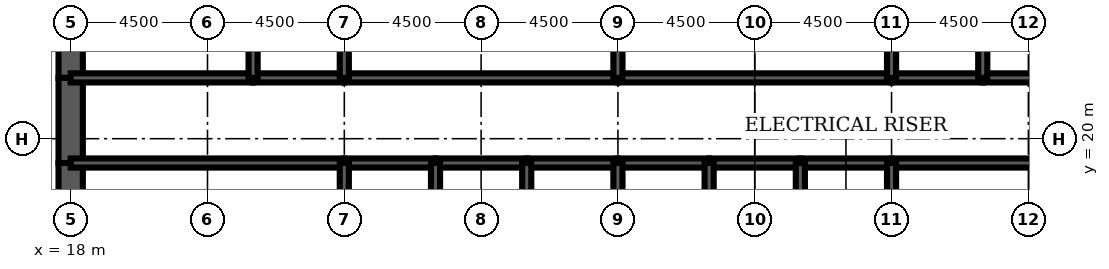
"""IFC4 building model, lengths in metres.
Left out: names, types, materials, properties, quantities, classifications, styles, units other than length and angle.
Written with IfcOpenShell. Run it as: python <this file> out.ifc"""

import sys

from ifc_helpers import new_model, si_unit, direction, frame, frame_2d, origin, place, context, subcontext, project, spatial, rectangle, extrude, element, fill, save


model = new_model("IFC4")
c1 = context("Model", 3, precision=1e-05, world=origin(), true_north=direction((0.0, 1.0)))
c2 = subcontext(c1, "Body", "Model", "MODEL_VIEW")
j1 = project(units=[si_unit("LENGTHUNIT", "METRE"), si_unit("PLANEANGLEUNIT", "RADIAN")], contexts=[c1])
p1 = place(None, origin())
s1 = spatial("IfcSite", under=j1, at=p1, CompositionType="ELEMENT")
p2 = place(p1, origin())
s2 = spatial("IfcBuilding", under=s1, at=p2, CompositionType="ELEMENT")
p3 = place(p2, frame((0.0, 0.0, 232.0)))
s3 = spatial("IfcBuildingStorey", under=s2, at=p3, CompositionType="ELEMENT", Elevation=232.0)
p4 = place(p3, frame((18.0, 26.0, 0.0), z_axis=(0.0, 0.0, 1.0), x_axis=(0.0, -1.0, 0.0)))
e1 = element("IfcWall", 1, at=p4, inside=s3, PredefinedType="SHEAR", context=c2, shape_type="SweptSolid", body=[
    extrude(rectangle(XDim=4.0, YDim=0.8, at=frame_2d((2.0, 0.0))), origin(), (0.0, 0.0, 1.0), 4.2),
])
p5 = place(p3, frame((18.0, 22.0, 0.0), z_axis=(0.0, 0.0, 1.0), x_axis=(0.0, -1.0, 0.0)))
e2 = element("IfcWall", 2, at=p5, inside=s3, PredefinedType="SHEAR", context=c2, shape_type="SweptSolid", body=[
    extrude(rectangle(XDim=2.8, YDim=0.8, at=frame_2d((1.4, 0.0))), origin(), (0.0, 0.0, 1.0), 4.2),
])
p6 = place(p5, frame((0.6, 0.0, 0.0)))
e3 = element("IfcOpeningElement", 3, at=p6, cuts=e2, PredefinedType="OPENING", context=c2, shape_type="SweptSolid", body=[
    extrude(rectangle(XDim=1.8, YDim=2.1, at=frame_2d((0.9, 1.05))), frame((0.0, 0.41, 0.0), z_axis=(0.0, -1.0, 0.0), x_axis=(1.0, 0.0, 0.0)), (0.0, 0.0, 1.0), 0.82),
])
p7 = place(p3, frame((18.0, 19.2, 0.0), z_axis=(0.0, 0.0, 1.0), x_axis=(0.0, -1.0, 0.0)))
e4 = element("IfcWall", 4, at=p7, inside=s3, PredefinedType="SHEAR", context=c2, shape_type="SweptSolid", body=[
    extrude(rectangle(XDim=3.2, YDim=0.8, at=frame_2d((1.6, 0.0))), origin(), (0.0, 0.0, 1.0), 4.2),
])
p8 = place(p3, frame((18.0, 19.2, 0.0), z_axis=(0.0, 0.0, 1.0), x_axis=(1.0, 0.0, 0.0)))
e5 = element("IfcWall", 5, at=p8, inside=s3, PredefinedType="SOLIDWALL", context=c2, shape_type="SweptSolid", body=[
    extrude(rectangle(XDim=9.0, YDim=0.3, at=frame_2d((4.5, 0.0))), origin(), (0.0, 0.0, 1.0), 4.2),
])
p9 = place(p8, frame((0.65, 0.0, 0.0)))
e6 = element("IfcOpeningElement", 6, at=p9, cuts=e5, PredefinedType="OPENING", context=c2, shape_type="SweptSolid", body=[
    extrude(rectangle(XDim=1.0, YDim=2.1, at=frame_2d((0.5, 1.05))), frame((0.0, 0.16, 0.0), z_axis=(0.0, -1.0, 0.0), x_axis=(1.0, 0.0, 0.0)), (0.0, 0.0, 1.0), 0.32),
])
p10 = place(p3, frame((27.0, 19.2, 0.0), z_axis=(0.0, 0.0, 1.0), x_axis=(1.0, 0.0, 0.0)))
e7 = element("IfcWall", 7, at=p10, inside=s3, PredefinedType="SOLIDWALL", context=c2, shape_type="SweptSolid", body=[
    extrude(rectangle(XDim=3.0, YDim=0.3, at=frame_2d((1.5, 0.0))), origin(), (0.0, 0.0, 1.0), 4.2),
])
p11 = place(p10, frame((0.95, 0.0, 0.0)))
e8 = element("IfcOpeningElement", 8, at=p11, cuts=e7, PredefinedType="OPENING", context=c2, shape_type="SweptSolid", body=[
    extrude(rectangle(XDim=1.1, YDim=2.2, at=frame_2d((0.55, 1.1))), frame((0.0, 0.16, 0.0), z_axis=(0.0, -1.0, 0.0), x_axis=(1.0, 0.0, 0.0)), (0.0, 0.0, 1.0), 0.32),
])
p12 = place(p3, frame((30.0, 19.2, 0.0), z_axis=(0.0, 0.0, 1.0), x_axis=(1.0, 0.0, 0.0)))
e9 = element("IfcWall", 9, at=p12, inside=s3, PredefinedType="SOLIDWALL", context=c2, shape_type="SweptSolid", body=[
    extrude(rectangle(XDim=3.0, YDim=0.3, at=frame_2d((1.5, 0.0))), origin(), (0.0, 0.0, 1.0), 4.2),
])
p13 = place(p12, frame((0.95, 0.0, 0.0)))
e10 = element("IfcOpeningElement", 10, at=p13, cuts=e9, PredefinedType="OPENING", context=c2, shape_type="SweptSolid", body=[
    extrude(rectangle(XDim=1.1, YDim=2.2, at=frame_2d((0.55, 1.1))), frame((0.0, 0.16, 0.0), z_axis=(0.0, -1.0, 0.0), x_axis=(1.0, 0.0, 0.0)), (0.0, 0.0, 1.0), 0.32),
])
p14 = place(p3, frame((33.0, 19.2, 0.0), z_axis=(0.0, 0.0, 1.0), x_axis=(1.0, 0.0, 0.0)))
e11 = element("IfcWall", 11, at=p14, inside=s3, PredefinedType="SOLIDWALL", context=c2, shape_type="SweptSolid", body=[
    extrude(rectangle(XDim=3.0, YDim=0.3, at=frame_2d((1.5, 0.0))), origin(), (0.0, 0.0, 1.0), 4.2),
])
p15 = place(p14, frame((0.95, 0.0, 0.0)))
e12 = element("IfcOpeningElement", 12, at=p15, cuts=e11, PredefinedType="OPENING", context=c2, shape_type="SweptSolid", body=[
    extrude(rectangle(XDim=1.1, YDim=2.2, at=frame_2d((0.55, 1.1))), frame((0.0, 0.16, 0.0), z_axis=(0.0, -1.0, 0.0), x_axis=(1.0, 0.0, 0.0)), (0.0, 0.0, 1.0), 0.32),
])
p16 = place(p3, frame((36.0, 19.2, 0.0), z_axis=(0.0, 0.0, 1.0), x_axis=(1.0, 0.0, 0.0)))
e13 = element("IfcWall", 13, at=p16, inside=s3, PredefinedType="SOLIDWALL", context=c2, shape_type="SweptSolid", body=[
    extrude(rectangle(XDim=3.0, YDim=0.3, at=frame_2d((1.5, 0.0))), origin(), (0.0, 0.0, 1.0), 4.2),
])
p17 = place(p16, frame((0.95, 0.0, 0.0)))
e14 = element("IfcOpeningElement", 14, at=p17, cuts=e13, PredefinedType="OPENING", context=c2, shape_type="SweptSolid", body=[
    extrude(rectangle(XDim=1.1, YDim=2.2, at=frame_2d((0.55, 1.1))), frame((0.0, 0.16, 0.0), z_axis=(0.0, -1.0, 0.0), x_axis=(1.0, 0.0, 0.0)), (0.0, 0.0, 1.0), 0.32),
])
p18 = place(p3, frame((39.0, 19.2, 0.0), z_axis=(0.0, 0.0, 1.0), x_axis=(1.0, 0.0, 0.0)))
e15 = element("IfcWall", 15, at=p18, inside=s3, PredefinedType="SOLIDWALL", context=c2, shape_type="SweptSolid", body=[
    extrude(rectangle(XDim=3.0, YDim=0.3, at=frame_2d((1.5, 0.0))), origin(), (0.0, 0.0, 1.0), 4.2),
])
p19 = place(p18, frame((1.0, 0.0, 0.0)))
e16 = element("IfcOpeningElement", 16, at=p19, cuts=e15, PredefinedType="OPENING", context=c2, shape_type="SweptSolid", body=[
    extrude(rectangle(XDim=1.0, YDim=2.1, at=frame_2d((0.5, 1.05))), frame((0.0, 0.16, 0.0), z_axis=(0.0, -1.0, 0.0), x_axis=(1.0, 0.0, 0.0)), (0.0, 0.0, 1.0), 0.32),
])
p20 = place(p3, frame((42.0, 19.2, 0.0), z_axis=(0.0, 0.0, 1.0), x_axis=(1.0, 0.0, 0.0)))
e17 = element("IfcWall", 17, at=p20, inside=s3, PredefinedType="SOLIDWALL", context=c2, shape_type="SweptSolid", body=[
    extrude(rectangle(XDim=3.0, YDim=0.3, at=frame_2d((1.5, 0.0))), origin(), (0.0, 0.0, 1.0), 4.2),
])
p21 = place(p20, frame((1.0, 0.0, 0.0)))
e18 = element("IfcOpeningElement", 18, at=p21, cuts=e17, PredefinedType="OPENING", context=c2, shape_type="SweptSolid", body=[
    extrude(rectangle(XDim=1.0, YDim=2.1, at=frame_2d((0.5, 1.05))), frame((0.0, 0.16, 0.0), z_axis=(0.0, -1.0, 0.0), x_axis=(1.0, 0.0, 0.0)), (0.0, 0.0, 1.0), 0.32),
])
p22 = place(p3, frame((45.0, 19.2, 0.0), z_axis=(0.0, 0.0, 1.0), x_axis=(1.0, 0.0, 0.0)))
e19 = element("IfcWall", 19, at=p22, inside=s3, PredefinedType="SOLIDWALL", context=c2, shape_type="SweptSolid", body=[
    extrude(rectangle(XDim=9.0, YDim=0.3, at=frame_2d((4.5, 0.0))), origin(), (0.0, 0.0, 1.0), 4.2),
])
p23 = place(p22, frame((7.35, 0.0, 0.0)))
e20 = element("IfcOpeningElement", 20, at=p23, cuts=e19, PredefinedType="OPENING", context=c2, shape_type="SweptSolid", body=[
    extrude(rectangle(XDim=1.0, YDim=2.1, at=frame_2d((0.5, 1.05))), frame((0.0, 0.16, 0.0), z_axis=(0.0, -1.0, 0.0), x_axis=(1.0, 0.0, 0.0)), (0.0, 0.0, 1.0), 0.32),
])
p24 = place(p3, frame((18.0, 22.0, 0.0), z_axis=(0.0, 0.0, 1.0), x_axis=(1.0, 0.0, 0.0)))
e21 = element("IfcWall", 21, at=p24, inside=s3, PredefinedType="SOLIDWALL", context=c2, shape_type="SweptSolid", body=[
    extrude(rectangle(XDim=6.0, YDim=0.3, at=frame_2d((3.0, 0.0))), origin(), (0.0, 0.0, 1.0), 4.2),
])
p25 = place(p24, frame((4.4, 0.0, 0.0)))
e22 = element("IfcOpeningElement", 22, at=p25, cuts=e21, PredefinedType="OPENING", context=c2, shape_type="SweptSolid", body=[
    extrude(rectangle(XDim=1.0, YDim=2.1, at=frame_2d((0.5, 1.05))), frame((0.0, 0.16, 0.0), z_axis=(0.0, -1.0, 0.0), x_axis=(1.0, 0.0, 0.0)), (0.0, 0.0, 1.0), 0.32),
])
p26 = place(p24, frame((0.8, 0.0, 0.0)))
e23 = element("IfcOpeningElement", 23, at=p26, cuts=e21, PredefinedType="OPENING", context=c2, shape_type="SweptSolid", body=[
    extrude(rectangle(XDim=1.0, YDim=2.1, at=frame_2d((0.5, 1.05))), frame((0.0, 0.16, 0.0), z_axis=(0.0, -1.0, 0.0), x_axis=(1.0, 0.0, 0.0)), (0.0, 0.0, 1.0), 0.32),
])
p27 = place(p3, frame((24.0, 22.0, 0.0), z_axis=(0.0, 0.0, 1.0), x_axis=(1.0, 0.0, 0.0)))
e24 = element("IfcWall", 24, at=p27, inside=s3, PredefinedType="SOLIDWALL", context=c2, shape_type="SweptSolid", body=[
    extrude(rectangle(XDim=3.0, YDim=0.3, at=frame_2d((1.5, 0.0))), origin(), (0.0, 0.0, 1.0), 4.2),
])
p28 = place(p27, frame((1.0, 0.0, 0.0)))
e25 = element("IfcOpeningElement", 25, at=p28, cuts=e24, PredefinedType="OPENING", context=c2, shape_type="SweptSolid", body=[
    extrude(rectangle(XDim=1.0, YDim=2.1, at=frame_2d((0.5, 1.05))), frame((0.0, 0.16, 0.0), z_axis=(0.0, -1.0, 0.0), x_axis=(1.0, 0.0, 0.0)), (0.0, 0.0, 1.0), 0.32),
])
p29 = place(p3, frame((27.0, 22.0, 0.0), z_axis=(0.0, 0.0, 1.0), x_axis=(1.0, 0.0, 0.0)))
e26 = element("IfcWall", 26, at=p29, inside=s3, PredefinedType="SOLIDWALL", context=c2, shape_type="SweptSolid", body=[
    extrude(rectangle(XDim=9.0, YDim=0.3, at=frame_2d((4.5, 0.0))), origin(), (0.0, 0.0, 1.0), 4.2),
])
p30 = place(p29, frame((4.0, 0.0, 0.0)))
e27 = element("IfcOpeningElement", 27, at=p30, cuts=e26, PredefinedType="OPENING", context=c2, shape_type="SweptSolid", body=[
    extrude(rectangle(XDim=1.0, YDim=2.1, at=frame_2d((0.5, 1.05))), frame((0.0, 0.16, 0.0), z_axis=(0.0, -1.0, 0.0), x_axis=(1.0, 0.0, 0.0)), (0.0, 0.0, 1.0), 0.32),
])
p31 = place(p3, frame((36.0, 22.0, 0.0), z_axis=(0.0, 0.0, 1.0), x_axis=(1.0, 0.0, 0.0)))
e28 = element("IfcWall", 28, at=p31, inside=s3, PredefinedType="SOLIDWALL", context=c2, shape_type="SweptSolid", body=[
    extrude(rectangle(XDim=9.0, YDim=0.3, at=frame_2d((4.5, 0.0))), origin(), (0.0, 0.0, 1.0), 4.2),
])
p32 = place(p31, frame((4.0, 0.0, 0.0)))
e29 = element("IfcOpeningElement", 29, at=p32, cuts=e28, PredefinedType="OPENING", context=c2, shape_type="SweptSolid", body=[
    extrude(rectangle(XDim=1.0, YDim=2.1, at=frame_2d((0.5, 1.05))), frame((0.0, 0.16, 0.0), z_axis=(0.0, -1.0, 0.0), x_axis=(1.0, 0.0, 0.0)), (0.0, 0.0, 1.0), 0.32),
])
p33 = place(p3, frame((45.0, 22.0, 0.0), z_axis=(0.0, 0.0, 1.0), x_axis=(1.0, 0.0, 0.0)))
e30 = element("IfcWall", 30, at=p33, inside=s3, PredefinedType="SOLIDWALL", context=c2, shape_type="SweptSolid", body=[
    extrude(rectangle(XDim=3.0, YDim=0.3, at=frame_2d((1.5, 0.0))), origin(), (0.0, 0.0, 1.0), 4.2),
])
p34 = place(p33, frame((1.0, 0.0, 0.0)))
e31 = element("IfcOpeningElement", 31, at=p34, cuts=e30, PredefinedType="OPENING", context=c2, shape_type="SweptSolid", body=[
    extrude(rectangle(XDim=1.0, YDim=2.1, at=frame_2d((0.5, 1.05))), frame((0.0, 0.16, 0.0), z_axis=(0.0, -1.0, 0.0), x_axis=(1.0, 0.0, 0.0)), (0.0, 0.0, 1.0), 0.32),
])
p35 = place(p3, frame((48.0, 22.0, 0.0), z_axis=(0.0, 0.0, 1.0), x_axis=(1.0, 0.0, 0.0)))
e32 = element("IfcWall", 32, at=p35, inside=s3, PredefinedType="SOLIDWALL", context=c2, shape_type="SweptSolid", body=[
    extrude(rectangle(XDim=6.0, YDim=0.3, at=frame_2d((3.0, 0.0))), origin(), (0.0, 0.0, 1.0), 4.2),
])
p36 = place(p35, frame((2.0, 0.0, 0.0)))
e33 = element("IfcOpeningElement", 33, at=p36, cuts=e32, PredefinedType="OPENING", context=c2, shape_type="SweptSolid", body=[
    extrude(rectangle(XDim=1.0, YDim=2.1, at=frame_2d((0.5, 1.05))), frame((0.0, 0.16, 0.0), z_axis=(0.0, -1.0, 0.0), x_axis=(1.0, 0.0, 0.0)), (0.0, 0.0, 1.0), 0.32),
])
p37 = place(p35, frame((4.2, 0.0, 0.0)))
e34 = element("IfcOpeningElement", 34, at=p37, cuts=e32, PredefinedType="OPENING", context=c2, shape_type="SweptSolid", body=[
    extrude(rectangle(XDim=1.0, YDim=2.1, at=frame_2d((0.5, 1.05))), frame((0.0, 0.16, 0.0), z_axis=(0.0, -1.0, 0.0), x_axis=(1.0, 0.0, 0.0)), (0.0, 0.0, 1.0), 0.32),
])
for number, where, z_axis, x_axis in (
    (35, (27.0, 16.0, 0.0), (0.0, 0.0, 1.0), (0.0, 1.0, 0.0)),
    (36, (30.0, 16.0, 0.0), (0.0, 0.0, 1.0), (0.0, 1.0, 0.0)),
    (37, (33.0, 16.0, 0.0), (0.0, 0.0, 1.0), (0.0, 1.0, 0.0)),
    (38, (36.0, 16.0, 0.0), (0.0, 0.0, 1.0), (0.0, 1.0, 0.0)),
    (39, (39.0, 16.0, 0.0), (0.0, 0.0, 1.0), (0.0, 1.0, 0.0)),
    (40, (42.0, 16.0, 0.0), (0.0, 0.0, 1.0), (0.0, 1.0, 0.0)),
    (41, (45.0, 16.0, 0.0), (0.0, 0.0, 1.0), (0.0, 1.0, 0.0)),
):
    element("IfcWall", number, at=place(p3, frame(where, z_axis=z_axis, x_axis=x_axis)), inside=s3, PredefinedType="SOLIDWALL", context=c2, shape_type="SweptSolid", body=[
        extrude(rectangle(XDim=3.2, YDim=0.3, at=frame_2d((1.6, 0.0))), origin(), (0.0, 0.0, 1.0), 4.2),
    ])
for number, where, z_axis, x_axis in (
    (42, (24.0, 22.0, 0.0), (0.0, 0.0, 1.0), (0.0, 1.0, 0.0)),
    (43, (27.0, 22.0, 0.0), (0.0, 0.0, 1.0), (0.0, 1.0, 0.0)),
    (44, (36.0, 22.0, 0.0), (0.0, 0.0, 1.0), (0.0, 1.0, 0.0)),
    (45, (45.0, 22.0, 0.0), (0.0, 0.0, 1.0), (0.0, 1.0, 0.0)),
    (46, (48.0, 22.0, 0.0), (0.0, 0.0, 1.0), (0.0, 1.0, 0.0)),
):
    element("IfcWall", number, at=place(p3, frame(where, z_axis=z_axis, x_axis=x_axis)), inside=s3, PredefinedType="SOLIDWALL", context=c2, shape_type="SweptSolid", body=[
        extrude(rectangle(XDim=4.0, YDim=0.3, at=frame_2d((2.0, 0.0))), origin(), (0.0, 0.0, 1.0), 4.2),
    ])
p38 = place(p3, frame((38.0, 22.15, 0.0), z_axis=(0.0, 0.0, 1.0), x_axis=(0.0, 1.0, 0.0)))
e47 = element("IfcWall", 47, at=p38, inside=s3, PredefinedType="PARTITIONING", context=c2, shape_type="SweptSolid", body=[
    extrude(rectangle(XDim=3.7, YDim=0.15, at=frame_2d((1.85, 0.0))), origin(), (0.0, 0.0, 1.0), 3.0),
])
p39 = place(p38, frame((2.2, 0.0, 0.0)))
e48 = element("IfcOpeningElement", 48, at=p39, cuts=e47, PredefinedType="OPENING", context=c2, shape_type="SweptSolid", body=[
    extrude(rectangle(XDim=1.0, YDim=2.1, at=frame_2d((0.5, 1.05))), frame((0.0, 0.085, 0.0), z_axis=(0.0, -1.0, 0.0), x_axis=(1.0, 0.0, 0.0)), (0.0, 0.0, 1.0), 0.17),
])
p40 = place(p3, frame((20.275, 22.15, 0.0), z_axis=(0.0, 0.0, 1.0), x_axis=(0.0, 1.0, 0.0)))
e49 = element("IfcWall", 49, at=p40, inside=s3, PredefinedType="PARTITIONING", context=c2, shape_type="SweptSolid", body=[
    extrude(rectangle(XDim=3.7, YDim=0.15, at=frame_2d((1.85, 0.0))), origin(), (0.0, 0.0, 1.0), 3.0),
])
p41 = place(p3, frame((48.6, 19.35, 0.0), z_axis=(0.0, 0.0, 1.0), x_axis=(0.0, 1.0, 0.0)))
e50 = element("IfcWall", 50, at=p41, inside=s3, PredefinedType="PARTITIONING", context=c2, shape_type="SweptSolid", body=[
    extrude(rectangle(XDim=2.5, YDim=0.15, at=frame_2d((1.25, 0.0))), origin(), (0.0, 0.0, 1.0), 3.0),
])
p42 = place(p41, frame((1.15, 0.0, 0.0)))
e51 = element("IfcOpeningElement", 51, at=p42, cuts=e50, PredefinedType="OPENING", context=c2, shape_type="SweptSolid", body=[
    extrude(rectangle(XDim=1.0, YDim=2.1, at=frame_2d((0.5, 1.05))), frame((0.0, 0.085, 0.0), z_axis=(0.0, -1.0, 0.0), x_axis=(1.0, 0.0, 0.0)), (0.0, 0.0, 1.0), 0.17),
])
p43 = place(p42, origin())
e52 = element("IfcDoor", 52, at=p43, inside=s3, OperationType="SINGLE_SWING_RIGHT", PredefinedType="DOOR", context=c2, shape_type="SweptSolid", body=[
    extrude(rectangle(XDim=1.0, YDim=2.1, at=frame_2d((0.5, 1.05))), frame((0.0, 0.025, 0.0), z_axis=(0.0, -1.0, 0.0), x_axis=(1.0, 0.0, 0.0)), (0.0, 0.0, 1.0), 0.05),
])
fill(e51, e52)
p44 = place(p11, origin())
e53 = element("IfcDoor", 53, at=p44, inside=s3, OperationType="DOUBLE_DOOR_SLIDING", PredefinedType="USERDEFINED", context=c2, shape_type="SweptSolid", body=[
    extrude(rectangle(XDim=1.1, YDim=2.2, at=frame_2d((0.55, 1.1))), frame((0.0, 0.025, 0.0), z_axis=(0.0, -1.0, 0.0), x_axis=(1.0, 0.0, 0.0)), (0.0, 0.0, 1.0), 0.05),
])
fill(e8, e53)
p45 = place(p13, origin())
e54 = element("IfcDoor", 54, at=p45, inside=s3, OperationType="DOUBLE_DOOR_SLIDING", PredefinedType="USERDEFINED", context=c2, shape_type="SweptSolid", body=[
    extrude(rectangle(XDim=1.1, YDim=2.2, at=frame_2d((0.55, 1.1))), frame((0.0, 0.025, 0.0), z_axis=(0.0, -1.0, 0.0), x_axis=(1.0, 0.0, 0.0)), (0.0, 0.0, 1.0), 0.05),
])
fill(e10, e54)
p46 = place(p15, origin())
e55 = element("IfcDoor", 55, at=p46, inside=s3, OperationType="DOUBLE_DOOR_SLIDING", PredefinedType="USERDEFINED", context=c2, shape_type="SweptSolid", body=[
    extrude(rectangle(XDim=1.1, YDim=2.2, at=frame_2d((0.55, 1.1))), frame((0.0, 0.025, 0.0), z_axis=(0.0, -1.0, 0.0), x_axis=(1.0, 0.0, 0.0)), (0.0, 0.0, 1.0), 0.05),
])
fill(e12, e55)
p47 = place(p17, origin())
e56 = element("IfcDoor", 56, at=p47, inside=s3, OperationType="DOUBLE_DOOR_SLIDING", PredefinedType="USERDEFINED", context=c2, shape_type="SweptSolid", body=[
    extrude(rectangle(XDim=1.1, YDim=2.2, at=frame_2d((0.55, 1.1))), frame((0.0, 0.025, 0.0), z_axis=(0.0, -1.0, 0.0), x_axis=(1.0, 0.0, 0.0)), (0.0, 0.0, 1.0), 0.05),
])
fill(e14, e56)
p48 = place(p9, origin())
e57 = element("IfcDoor", 57, at=p48, inside=s3, OperationType="SINGLE_SWING_LEFT", PredefinedType="DOOR", context=c2, shape_type="SweptSolid", body=[
    extrude(rectangle(XDim=1.0, YDim=2.1, at=frame_2d((0.5, 1.05))), frame((0.0, 0.025, 0.0), z_axis=(0.0, -1.0, 0.0), x_axis=(1.0, 0.0, 0.0)), (0.0, 0.0, 1.0), 0.05),
])
fill(e6, e57)
p49 = place(p6, origin())
e58 = element("IfcDoor", 58, at=p49, inside=s3, OperationType="SINGLE_SWING_LEFT", PredefinedType="DOOR", context=c2, shape_type="SweptSolid", body=[
    extrude(rectangle(XDim=1.8, YDim=2.1, at=frame_2d((0.9, 1.05))), frame((0.0, 0.4, 0.0), z_axis=(0.0, -1.0, 0.0), x_axis=(1.0, 0.0, 0.0)), (0.0, 0.0, 1.0), 0.8),
])
fill(e3, e58)
p50 = place(p25, origin())
e59 = element("IfcDoor", 59, at=p50, inside=s3, OperationType="SINGLE_SWING_RIGHT", PredefinedType="DOOR", context=c2, shape_type="SweptSolid", body=[
    extrude(rectangle(XDim=1.0, YDim=2.1, at=frame_2d((0.5, 1.05))), frame((0.0, 0.025, 0.0), z_axis=(0.0, -1.0, 0.0), x_axis=(1.0, 0.0, 0.0)), (0.0, 0.0, 1.0), 0.05),
])
fill(e22, e59)
p51 = place(p28, origin())
e60 = element("IfcDoor", 60, at=p51, inside=s3, OperationType="SINGLE_SWING_LEFT", PredefinedType="DOOR", context=c2, shape_type="SweptSolid", body=[
    extrude(rectangle(XDim=1.0, YDim=2.1, at=frame_2d((0.5, 1.05))), frame((0.0, 0.025, 0.0), z_axis=(0.0, -1.0, 0.0), x_axis=(1.0, 0.0, 0.0)), (0.0, 0.0, 1.0), 0.05),
])
fill(e25, e60)
p52 = place(p30, origin())
e61 = element("IfcDoor", 61, at=p52, inside=s3, OperationType="SINGLE_SWING_LEFT", PredefinedType="DOOR", context=c2, shape_type="SweptSolid", body=[
    extrude(rectangle(XDim=1.0, YDim=2.1, at=frame_2d((0.5, 1.05))), frame((0.0, 0.025, 0.0), z_axis=(0.0, -1.0, 0.0), x_axis=(1.0, 0.0, 0.0)), (0.0, 0.0, 1.0), 0.05),
])
fill(e27, e61)
p53 = place(p32, origin())
e62 = element("IfcDoor", 62, at=p53, inside=s3, OperationType="SINGLE_SWING_LEFT", PredefinedType="DOOR", context=c2, shape_type="SweptSolid", body=[
    extrude(rectangle(XDim=1.0, YDim=2.1, at=frame_2d((0.5, 1.05))), frame((0.0, 0.025, 0.0), z_axis=(0.0, -1.0, 0.0), x_axis=(1.0, 0.0, 0.0)), (0.0, 0.0, 1.0), 0.05),
])
fill(e29, e62)
p54 = place(p34, origin())
e63 = element("IfcDoor", 63, at=p54, inside=s3, OperationType="SINGLE_SWING_LEFT", PredefinedType="DOOR", context=c2, shape_type="SweptSolid", body=[
    extrude(rectangle(XDim=1.0, YDim=2.1, at=frame_2d((0.5, 1.05))), frame((0.0, 0.025, 0.0), z_axis=(0.0, -1.0, 0.0), x_axis=(1.0, 0.0, 0.0)), (0.0, 0.0, 1.0), 0.05),
])
fill(e31, e63)
p55 = place(p26, origin())
e64 = element("IfcDoor", 64, at=p55, inside=s3, OperationType="SINGLE_SWING_LEFT", PredefinedType="DOOR", context=c2, shape_type="SweptSolid", body=[
    extrude(rectangle(XDim=1.0, YDim=2.1, at=frame_2d((0.5, 1.05))), frame((0.0, 0.025, 0.0), z_axis=(0.0, -1.0, 0.0), x_axis=(1.0, 0.0, 0.0)), (0.0, 0.0, 1.0), 0.05),
])
fill(e23, e64)
p56 = place(p19, origin())
e65 = element("IfcDoor", 65, at=p56, inside=s3, OperationType="SINGLE_SWING_LEFT", PredefinedType="DOOR", context=c2, shape_type="SweptSolid", body=[
    extrude(rectangle(XDim=1.0, YDim=2.1, at=frame_2d((0.5, 1.05))), frame((0.0, 0.025, 0.0), z_axis=(0.0, -1.0, 0.0), x_axis=(1.0, 0.0, 0.0)), (0.0, 0.0, 1.0), 0.05),
])
fill(e16, e65)
p57 = place(p21, origin())
e66 = element("IfcDoor", 66, at=p57, inside=s3, OperationType="SINGLE_SWING_LEFT", PredefinedType="DOOR", context=c2, shape_type="SweptSolid", body=[
    extrude(rectangle(XDim=1.0, YDim=2.1, at=frame_2d((0.5, 1.05))), frame((0.0, 0.025, 0.0), z_axis=(0.0, -1.0, 0.0), x_axis=(1.0, 0.0, 0.0)), (0.0, 0.0, 1.0), 0.05),
])
fill(e18, e66)
save(model, sys.argv[1])
